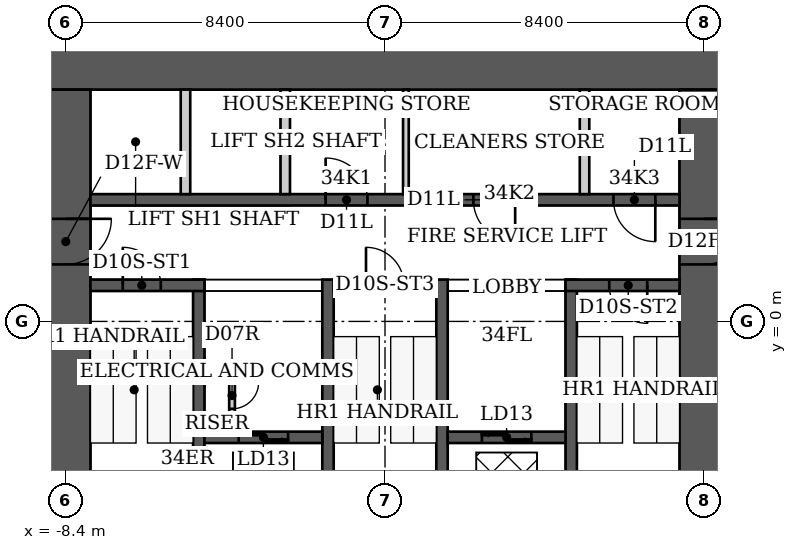
"""IFC4 building model, lengths in metres.
Left out: names, types, materials, properties, quantities, classifications, styles, units other than length and angle.
Written with IfcOpenShell. Run it as: python <this file> out.ifc"""

import sys

from ifc_helpers import new_model, si_unit, direction, frame, frame_2d, origin, place, context, subcontext, project, spatial, rectangle, extrude, element, fill, save


model = new_model("IFC4")
c1 = context("Model", 3, precision=1e-05, world=origin(), true_north=direction((0.0, 1.0)))
c2 = subcontext(c1, "Body", "Model", "MODEL_VIEW")
j1 = project(units=[si_unit("LENGTHUNIT", "METRE"), si_unit("PLANEANGLEUNIT", "RADIAN")], contexts=[c1])
p1 = place(None, origin())
s1 = spatial("IfcSite", under=j1, at=p1, CompositionType="ELEMENT")
p2 = place(p1, origin())
s2 = spatial("IfcBuilding", under=s1, at=p2, CompositionType="ELEMENT")
p3 = place(p2, frame((0.0, 0.0, 138.6)))
s3 = spatial("IfcBuildingStorey", under=s2, at=p3, CompositionType="ELEMENT", Elevation=138.6)
p4 = place(p3, frame((-9.05, 6.75, 0.0), z_axis=(0.0, 0.0, 1.0), x_axis=(1.0, 0.0, 0.0)))
e1 = element("IfcWall", 1, at=p4, inside=s3, PredefinedType="SHEAR", context=c2, shape_type="SweptSolid", body=[
    extrude(rectangle(XDim=18.1, YDim=1.3, at=frame_2d((9.05, 0.0))), origin(), (0.0, 0.0, 1.0), 3.8),
])
p5 = place(p3, frame((-8.4, -9.2, 0.0), z_axis=(0.0, 0.0, 1.0), x_axis=(0.0, 1.0, 0.0)))
e2 = element("IfcWall", 2, at=p5, inside=s3, PredefinedType="SHEAR", context=c2, shape_type="SweptSolid", body=[
    extrude(rectangle(XDim=15.3, YDim=1.3, at=frame_2d((7.65, 0.0))), origin(), (0.0, 0.0, 1.0), 3.8),
])
p6 = place(p5, frame((10.7, 0.0, 0.0)))
e3 = element("IfcOpeningElement", 3, at=p6, cuts=e2, PredefinedType="OPENING", context=c2, shape_type="SweptSolid", body=[
    extrude(rectangle(XDim=1.2, YDim=2.2, at=frame_2d((0.6, 1.1))), frame((0.0, 0.65, 0.0), z_axis=(0.0, -1.0, 0.0), x_axis=(1.0, 0.0, 0.0)), (0.0, 0.0, 1.0), 1.3),
])
p7 = place(p3, frame((8.4, -9.2, 0.0), z_axis=(0.0, 0.0, 1.0), x_axis=(0.0, 1.0, 0.0)))
e4 = element("IfcWall", 4, at=p7, inside=s3, PredefinedType="SHEAR", context=c2, shape_type="SweptSolid", body=[
    extrude(rectangle(XDim=15.3, YDim=1.3, at=frame_2d((7.65, 0.0))), origin(), (0.0, 0.0, 1.0), 3.8),
])
p8 = place(p7, frame((10.7, 0.0, 0.0)))
e5 = element("IfcOpeningElement", 5, at=p8, cuts=e4, PredefinedType="OPENING", context=c2, shape_type="SweptSolid", body=[
    extrude(rectangle(XDim=1.2, YDim=2.2, at=frame_2d((0.6, 1.1))), frame((0.0, 0.65, 0.0), z_axis=(0.0, -1.0, 0.0), x_axis=(1.0, 0.0, 0.0)), (0.0, 0.0, 1.0), 1.3),
])
for number, where, z_axis, x_axis in (
    (6, (-4.9, -6.1, 0.0), (0.0, 0.0, 1.0), (0.0, 1.0, 0.0)),
    (7, (-1.5, -6.1, 0.0), (0.0, 0.0, 1.0), (0.0, 1.0, 0.0)),
    (8, (1.5, -6.1, 0.0), (0.0, 0.0, 1.0), (0.0, 1.0, 0.0)),
    (9, (4.9, -6.1, 0.0), (0.0, 0.0, 1.0), (0.0, 1.0, 0.0)),
):
    element("IfcWall", number, at=place(p3, frame(where, z_axis=z_axis, x_axis=x_axis)), inside=s3, PredefinedType="SHEAR", context=c2, shape_type="SweptSolid", body=[
        extrude(rectangle(XDim=7.2, YDim=0.3, at=frame_2d((3.6, 0.0))), origin(), (0.0, 0.0, 1.0), 3.8),
    ])
p9 = place(p3, frame((-7.75, 0.95, 0.0), z_axis=(0.0, 0.0, 1.0), x_axis=(1.0, 0.0, 0.0)))
e10 = element("IfcWall", 10, at=p9, inside=s3, PredefinedType="SHEAR", context=c2, shape_type="SweptSolid", body=[
    extrude(rectangle(XDim=3.0, YDim=0.3, at=frame_2d((1.5, 0.0))), origin(), (0.0, 0.0, 1.0), 3.8),
])
p10 = place(p9, frame((0.85, 0.0, 0.0)))
e11 = element("IfcOpeningElement", 11, at=p10, cuts=e10, PredefinedType="OPENING", context=c2, shape_type="SweptSolid", body=[
    extrude(rectangle(XDim=1.0, YDim=2.2, at=frame_2d((0.5, 1.1))), frame((0.0, 0.15, 0.0), z_axis=(0.0, -1.0, 0.0), x_axis=(1.0, 0.0, 0.0)), (0.0, 0.0, 1.0), 0.3),
])
p11 = place(p3, frame((-1.35, 0.95, 0.0), z_axis=(0.0, 0.0, 1.0), x_axis=(1.0, 0.0, 0.0)))
e12 = element("IfcWall", 12, at=p11, inside=s3, PredefinedType="SHEAR", context=c2, shape_type="SweptSolid", body=[
    extrude(rectangle(XDim=2.7, YDim=0.3, at=frame_2d((1.35, 0.0))), origin(), (0.0, 0.0, 1.0), 3.8),
])
p12 = place(p11, frame((0.85, 0.0, 0.0)))
e13 = element("IfcOpeningElement", 13, at=p12, cuts=e12, PredefinedType="OPENING", context=c2, shape_type="SweptSolid", body=[
    extrude(rectangle(XDim=1.0, YDim=2.2, at=frame_2d((0.5, 1.1))), frame((0.0, 0.15, 0.0), z_axis=(0.0, -1.0, 0.0), x_axis=(1.0, 0.0, 0.0)), (0.0, 0.0, 1.0), 0.3),
])
p13 = place(p3, frame((4.75, 0.95, 0.0), z_axis=(0.0, 0.0, 1.0), x_axis=(1.0, 0.0, 0.0)))
e14 = element("IfcWall", 14, at=p13, inside=s3, PredefinedType="SHEAR", context=c2, shape_type="SweptSolid", body=[
    extrude(rectangle(XDim=3.0, YDim=0.3, at=frame_2d((1.5, 0.0))), origin(), (0.0, 0.0, 1.0), 3.8),
])
p14 = place(p13, frame((1.15, 0.0, 0.0)))
e15 = element("IfcOpeningElement", 15, at=p14, cuts=e14, PredefinedType="OPENING", context=c2, shape_type="SweptSolid", body=[
    extrude(rectangle(XDim=1.0, YDim=2.2, at=frame_2d((0.5, 1.1))), frame((0.0, 0.15, 0.0), z_axis=(0.0, -1.0, 0.0), x_axis=(1.0, 0.0, 0.0)), (0.0, 0.0, 1.0), 0.3),
])
p15 = place(p3, frame((-4.75, -3.05, 0.0), z_axis=(0.0, 0.0, 1.0), x_axis=(1.0, 0.0, 0.0)))
e16 = element("IfcWall", 16, at=p15, inside=s3, PredefinedType="SHEAR", context=c2, shape_type="SweptSolid", body=[
    extrude(rectangle(XDim=3.1, YDim=0.3, at=frame_2d((1.55, 0.0))), origin(), (0.0, 0.0, 1.0), 3.8),
])
p16 = place(p15, frame((0.9, 0.0, 0.0)))
e17 = element("IfcOpeningElement", 17, at=p16, cuts=e16, PredefinedType="OPENING", context=c2, shape_type="SweptSolid", body=[
    extrude(rectangle(XDim=1.3, YDim=2.1, at=frame_2d((0.65, 1.05))), frame((0.0, 0.15, 0.0), z_axis=(0.0, -1.0, 0.0), x_axis=(1.0, 0.0, 0.0)), (0.0, 0.0, 1.0), 0.3),
])
p17 = place(p3, frame((1.65, -3.05, 0.0), z_axis=(0.0, 0.0, 1.0), x_axis=(1.0, 0.0, 0.0)))
e18 = element("IfcWall", 18, at=p17, inside=s3, PredefinedType="SHEAR", context=c2, shape_type="SweptSolid", body=[
    extrude(rectangle(XDim=3.1, YDim=0.3, at=frame_2d((1.55, 0.0))), origin(), (0.0, 0.0, 1.0), 3.8),
])
p18 = place(p17, frame((0.9, 0.0, 0.0)))
e19 = element("IfcOpeningElement", 19, at=p18, cuts=e18, PredefinedType="OPENING", context=c2, shape_type="SweptSolid", body=[
    extrude(rectangle(XDim=1.3, YDim=2.1, at=frame_2d((0.65, 1.05))), frame((0.0, 0.15, 0.0), z_axis=(0.0, -1.0, 0.0), x_axis=(1.0, 0.0, 0.0)), (0.0, 0.0, 1.0), 0.3),
])
p19 = place(p3, frame((-7.75, 3.2, 0.0), z_axis=(0.0, 0.0, 1.0), x_axis=(1.0, 0.0, 0.0)))
e20 = element("IfcWall", 20, at=p19, inside=s3, PredefinedType="SHEAR", context=c2, shape_type="SweptSolid", body=[
    extrude(rectangle(XDim=15.5, YDim=0.3, at=frame_2d((7.75, 0.0))), origin(), (0.0, 0.0, 1.0), 3.8),
])
p20 = place(p19, frame((6.188, 0.0, 0.0)))
e21 = element("IfcOpeningElement", 21, at=p20, cuts=e20, PredefinedType="OPENING", context=c2, shape_type="SweptSolid", body=[
    extrude(rectangle(XDim=1.1, YDim=2.2, at=frame_2d((0.55, 1.1))), frame((0.0, 0.15, 0.0), z_axis=(0.0, -1.0, 0.0), x_axis=(1.0, 0.0, 0.0)), (0.0, 0.0, 1.0), 0.3),
])
p21 = place(p19, frame((10.075, 0.0, 0.0)))
e22 = element("IfcOpeningElement", 22, at=p21, cuts=e20, PredefinedType="OPENING", context=c2, shape_type="SweptSolid", body=[
    extrude(rectangle(XDim=1.1, YDim=2.2, at=frame_2d((0.55, 1.1))), frame((0.0, 0.15, 0.0), z_axis=(0.0, -1.0, 0.0), x_axis=(1.0, 0.0, 0.0)), (0.0, 0.0, 1.0), 0.3),
])
p22 = place(p19, frame((13.762, 0.0, 0.0)))
e23 = element("IfcOpeningElement", 23, at=p22, cuts=e20, PredefinedType="OPENING", context=c2, shape_type="SweptSolid", body=[
    extrude(rectangle(XDim=1.1, YDim=2.2, at=frame_2d((0.55, 1.1))), frame((0.0, 0.15, 0.0), z_axis=(0.0, -1.0, 0.0), x_axis=(1.0, 0.0, 0.0)), (0.0, 0.0, 1.0), 0.3),
])
for number, where, z_axis, x_axis in (
    (24, (-5.25, 3.35, 0.0), (0.0, 0.0, 1.0), (0.0, 1.0, 0.0)),
    (25, (-2.625, 3.35, 0.0), (0.0, 0.0, 1.0), (0.0, 1.0, 0.0)),
    (26, (5.25, 3.35, 0.0), (0.0, 0.0, 1.0), (0.0, 1.0, 0.0)),
):
    element("IfcWall", number, at=place(p3, frame(where, z_axis=z_axis, x_axis=x_axis)), inside=s3, PredefinedType="PARTITIONING", context=c2, shape_type="SweptSolid", body=[
        extrude(rectangle(XDim=2.75, YDim=0.25, at=frame_2d((1.375, 0.0))), origin(), (0.0, 0.0, 1.0), 3.8),
    ])
p23 = place(p3, frame((-4.025, -2.9, 0.0), z_axis=(0.0, 0.0, 1.0), x_axis=(0.0, 1.0, 0.0)))
e27 = element("IfcWall", 27, at=p23, inside=s3, PredefinedType="PARTITIONING", context=c2, shape_type="SweptSolid", body=[
    extrude(rectangle(XDim=1.775, YDim=0.15, at=frame_2d((0.887, 0.0))), origin(), (0.0, 0.0, 1.0), 3.64),
])
p24 = place(p23, frame((0.6, 0.0, 0.0)))
e28 = element("IfcOpeningElement", 28, at=p24, cuts=e27, PredefinedType="OPENING", context=c2, shape_type="SweptSolid", body=[
    extrude(rectangle(XDim=0.7, YDim=2.1, at=frame_2d((0.35, 1.05))), frame((0.0, 0.075, 0.0), z_axis=(0.0, -1.0, 0.0), x_axis=(1.0, 0.0, 0.0)), (0.0, 0.0, 1.0), 0.15),
])
p25 = place(p3, frame((-4.75, -1.2, 0.0), z_axis=(0.0, 0.0, 1.0), x_axis=(1.0, 0.0, 0.0)))
e29 = element("IfcWall", 29, at=p25, inside=s3, PredefinedType="PARTITIONING", context=c2, shape_type="SweptSolid", body=[
    extrude(rectangle(XDim=0.8, YDim=0.15, at=frame_2d((0.4, 0.0))), origin(), (0.0, 0.0, 1.0), 3.64),
])
p26 = place(p3, frame((0.55, 3.35, 0.0), z_axis=(0.0, 0.0, 1.0), x_axis=(0.0, 1.0, 0.0)))
e30 = element("IfcWall", 30, at=p26, inside=s3, PredefinedType="PARTITIONING", context=c2, shape_type="SweptSolid", body=[
    extrude(rectangle(XDim=2.75, YDim=0.15, at=frame_2d((1.375, 0.0))), origin(), (0.0, 0.0, 1.0), 3.64),
])
p27 = place(p10, origin())
e31 = element("IfcDoor", 31, at=p27, inside=s3, OperationType="SINGLE_SWING_LEFT", PredefinedType="DOOR", context=c2, shape_type="SweptSolid", body=[
    extrude(rectangle(XDim=1.0, YDim=2.2, at=frame_2d((0.5, 1.1))), frame((0.0, 0.025, 0.0), z_axis=(0.0, -1.0, 0.0), x_axis=(1.0, 0.0, 0.0)), (0.0, 0.0, 1.0), 0.05),
])
fill(e11, e31)
p28 = place(p12, origin())
e32 = element("IfcDoor", 32, at=p28, inside=s3, OperationType="SINGLE_SWING_LEFT", PredefinedType="DOOR", context=c2, shape_type="SweptSolid", body=[
    extrude(rectangle(XDim=1.0, YDim=2.2, at=frame_2d((0.5, 1.1))), frame((0.0, 0.025, 0.0), z_axis=(0.0, -1.0, 0.0), x_axis=(1.0, 0.0, 0.0)), (0.0, 0.0, 1.0), 0.05),
])
fill(e13, e32)
p29 = place(p14, origin())
e33 = element("IfcDoor", 33, at=p29, inside=s3, OperationType="SINGLE_SWING_RIGHT", PredefinedType="DOOR", context=c2, shape_type="SweptSolid", body=[
    extrude(rectangle(XDim=1.0, YDim=2.2, at=frame_2d((0.5, 1.1))), frame((0.0, 0.025, 0.0), z_axis=(0.0, -1.0, 0.0), x_axis=(1.0, 0.0, 0.0)), (0.0, 0.0, 1.0), 0.05),
])
fill(e15, e33)
p30 = place(p6, origin())
e34 = element("IfcDoor", 34, at=p30, inside=s3, OperationType="SINGLE_SWING_RIGHT", PredefinedType="DOOR", context=c2, shape_type="SweptSolid", body=[
    extrude(rectangle(XDim=1.2, YDim=2.2, at=frame_2d((0.6, 1.1))), frame((0.0, 0.025, 0.0), z_axis=(0.0, -1.0, 0.0), x_axis=(1.0, 0.0, 0.0)), (0.0, 0.0, 1.0), 0.05),
])
fill(e3, e34)
p31 = place(p8, origin())
e35 = element("IfcDoor", 35, at=p31, inside=s3, OperationType="SINGLE_SWING_RIGHT", PredefinedType="DOOR", context=c2, shape_type="SweptSolid", body=[
    extrude(rectangle(XDim=1.2, YDim=2.2, at=frame_2d((0.6, 1.1))), frame((0.0, 0.025, 0.0), z_axis=(0.0, -1.0, 0.0), x_axis=(1.0, 0.0, 0.0)), (0.0, 0.0, 1.0), 0.05),
])
fill(e5, e35)
p32 = place(p24, origin())
e36 = element("IfcDoor", 36, at=p32, inside=s3, OperationType="SINGLE_SWING_RIGHT", PredefinedType="DOOR", context=c2, shape_type="SweptSolid", body=[
    extrude(rectangle(XDim=0.7, YDim=2.1, at=frame_2d((0.35, 1.05))), frame((0.0, 0.025, 0.0), z_axis=(0.0, -1.0, 0.0), x_axis=(1.0, 0.0, 0.0)), (0.0, 0.0, 1.0), 0.05),
])
fill(e28, e36)
p33 = place(p20, origin())
e37 = element("IfcDoor", 37, at=p33, inside=s3, OperationType="SINGLE_SWING_LEFT", PredefinedType="DOOR", context=c2, shape_type="SweptSolid", body=[
    extrude(rectangle(XDim=1.1, YDim=2.2, at=frame_2d((0.55, 1.1))), frame((0.0, 0.025, 0.0), z_axis=(0.0, -1.0, 0.0), x_axis=(1.0, 0.0, 0.0)), (0.0, 0.0, 1.0), 0.05),
])
fill(e21, e37)
p34 = place(p21, origin())
e38 = element("IfcDoor", 38, at=p34, inside=s3, OperationType="SINGLE_SWING_RIGHT", PredefinedType="DOOR", context=c2, shape_type="SweptSolid", body=[
    extrude(rectangle(XDim=1.1, YDim=2.2, at=frame_2d((0.55, 1.1))), frame((0.0, 0.025, 0.0), z_axis=(0.0, -1.0, 0.0), x_axis=(1.0, 0.0, 0.0)), (0.0, 0.0, 1.0), 0.05),
])
fill(e22, e38)
p35 = place(p22, origin())
e39 = element("IfcDoor", 39, at=p35, inside=s3, OperationType="SINGLE_SWING_RIGHT", PredefinedType="DOOR", context=c2, shape_type="SweptSolid", body=[
    extrude(rectangle(XDim=1.1, YDim=2.2, at=frame_2d((0.55, 1.1))), frame((0.0, 0.025, 0.0), z_axis=(0.0, -1.0, 0.0), x_axis=(1.0, 0.0, 0.0)), (0.0, 0.0, 1.0), 0.05),
])
fill(e23, e39)
p36 = place(p16, origin())
e40 = element("IfcDoor", 40, at=p36, inside=s3, OperationType="DOUBLE_DOOR_SLIDING", PredefinedType="DOOR", context=c2, shape_type="SweptSolid", body=[
    extrude(rectangle(XDim=1.3, YDim=2.1, at=frame_2d((0.65, 1.05))), frame((0.0, 0.025, 0.0), z_axis=(0.0, -1.0, 0.0), x_axis=(1.0, 0.0, 0.0)), (0.0, 0.0, 1.0), 0.05),
])
fill(e17, e40)
p37 = place(p18, origin())
e41 = element("IfcDoor", 41, at=p37, inside=s3, OperationType="DOUBLE_DOOR_SLIDING", PredefinedType="DOOR", context=c2, shape_type="SweptSolid", body=[
    extrude(rectangle(XDim=1.3, YDim=2.1, at=frame_2d((0.65, 1.05))), frame((0.0, 0.025, 0.0), z_axis=(0.0, -1.0, 0.0), x_axis=(1.0, 0.0, 0.0)), (0.0, 0.0, 1.0), 0.05),
])
fill(e19, e41)
save(model, sys.argv[1])
